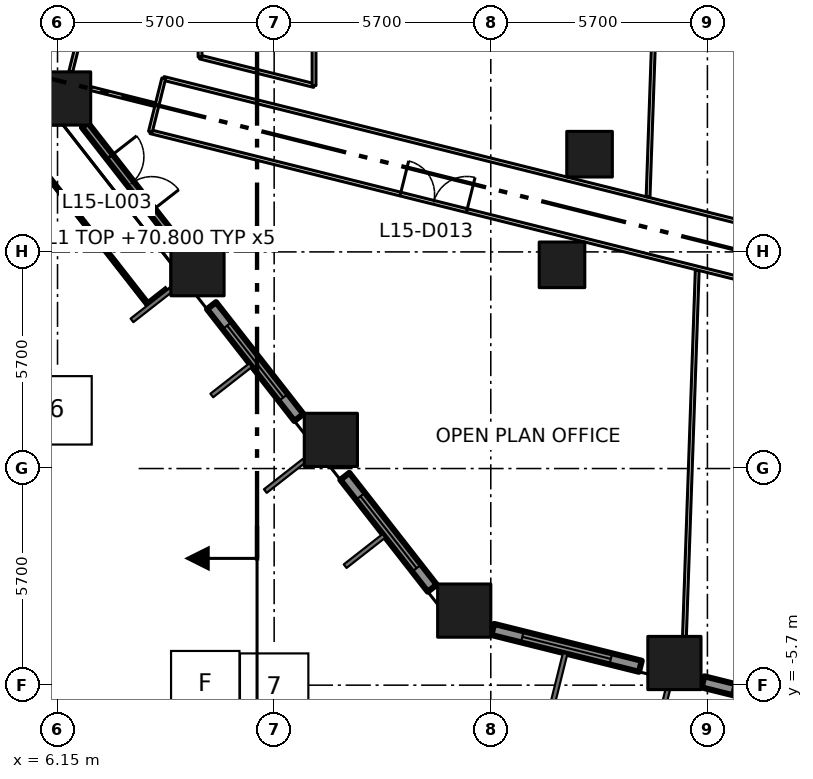
"""IFC4 building model, lengths in metres.
Left out: names, types, materials, properties, quantities, classifications, styles, units other than length and angle.
Written with IfcOpenShell. Run it as: python <this file> out.ifc"""

import sys

from ifc_helpers import new_model, si_unit, direction, frame, frame_2d, origin, origin_2d, place, context, subcontext, project, spatial, rectangle, extrude, element, fill, save


model = new_model("IFC4")
c1 = context("Model", 3, precision=1e-05, world=origin(), true_north=direction((0.0, 1.0)))
c2 = subcontext(c1, "Body", "Model", "MODEL_VIEW")
j1 = project(units=[si_unit("LENGTHUNIT", "METRE"), si_unit("PLANEANGLEUNIT", "RADIAN")], contexts=[c1])
p1 = place(None, origin())
s1 = spatial("IfcSite", under=j1, at=p1, CompositionType="ELEMENT")
p2 = place(p1, origin())
s2 = spatial("IfcBuilding", under=s1, at=p2, CompositionType="ELEMENT")
p3 = place(p2, frame((0.0, 0.0, 70.8)))
s3 = spatial("IfcBuildingStorey", under=s2, at=p3, CompositionType="ELEMENT", Elevation=70.8)
for number, where, z_axis, x_axis in (
    (1, (16.851, -3.738, 0.0), (0.0, 0.0, 1.0), (1.0, 0.0, 0.0)),
    (2, (13.342, 0.754, 0.0), (0.0, 0.0, 1.0), (1.0, 0.0, 0.0)),
    (3, (9.833, 5.245, 0.0), (0.0, 0.0, 1.0), (1.0, 0.0, 0.0)),
    (4, (6.323, 9.737, 0.0), (0.0, 0.0, 1.0), (1.0, 0.0, 0.0)),
    (5, (22.382, -5.117, 0.0), (0.0, 0.0, 1.0), (1.0, 0.0, 0.0)),
):
    element("IfcColumn", number, at=place(p3, frame(where, z_axis=z_axis, x_axis=x_axis)), inside=s3, PredefinedType="COLUMN", context=c2, shape_type="SweptSolid", body=[
        extrude(rectangle(XDim=1.4, YDim=1.4, at=origin_2d()), origin(), (0.0, 0.0, 1.0), 4.2),
    ])
for number, where, z_axis, x_axis in (
    (6, (19.424, 5.36, 0.0), (0.0, 0.0, 1.0), (1.0, 0.0, 0.0)),
    (7, (20.149, 8.271, 0.0), (0.0, 0.0, 1.0), (1.0, 0.0, 0.0)),
):
    element("IfcColumn", number, at=place(p3, frame(where, z_axis=z_axis, x_axis=x_axis)), inside=s3, PredefinedType="COLUMN", context=c2, shape_type="SweptSolid", body=[
        extrude(rectangle(XDim=1.2, YDim=1.2, at=origin_2d()), origin(), (0.0, 0.0, 1.0), 4.2),
    ])
p4 = place(p3, frame((6.871, 9.037, 0.0), z_axis=(0.0, 0.0, 1.0), x_axis=(0.615507574125, -0.788130970204, 0.0)))
e8 = element("IfcWall", 8, at=p4, inside=s3, PredefinedType="SOLIDWALL", context=c2, shape_type="SweptSolid", body=[
    extrude(rectangle(XDim=3.923, YDim=0.2, at=frame_2d((1.962, 0.0))), origin(), (0.0, 0.0, 1.0), 3.1),
])
p5 = place(p4, frame((1.061, 0.0, 0.0)))
e9 = element("IfcOpeningElement", 9, at=p5, cuts=e8, PredefinedType="OPENING", context=c2, shape_type="SweptSolid", body=[
    extrude(rectangle(XDim=1.8, YDim=2.9, at=frame_2d((0.9, 1.45))), frame((0.0, 0.11, 0.0), z_axis=(0.0, -1.0, 0.0), x_axis=(1.0, 0.0, 0.0)), (0.0, 0.0, 1.0), 0.22),
])
p6 = place(p3, frame((10.202, 4.286, 0.0), z_axis=(0.0, 0.0, 1.0), x_axis=(0.615636430057, -0.788030320474, 0.0)))
e10 = element("IfcWall", 10, at=p6, inside=s3, PredefinedType="SOLIDWALL", context=c2, shape_type="SweptSolid", body=[
    extrude(rectangle(XDim=3.734, YDim=0.3, at=frame_2d((1.867, 0.0))), origin(), (0.0, 0.0, 1.0), 3.1),
])
p7 = place(p6, frame((0.667, 0.0, 0.8)))
e11 = element("IfcOpeningElement", 11, at=p7, cuts=e10, PredefinedType="OPENING", context=c2, shape_type="SweptSolid", body=[
    extrude(rectangle(XDim=2.4, YDim=2.1, at=frame_2d((1.2, 1.05))), frame((0.0, 0.16, 0.0), z_axis=(0.0, -1.0, 0.0), x_axis=(1.0, 0.0, 0.0)), (0.0, 0.0, 1.0), 0.32),
])
p8 = place(p3, frame((13.71, -0.205, 0.0), z_axis=(0.0, 0.0, 1.0), x_axis=(0.615798780214, -0.787903460004, 0.0)))
e12 = element("IfcWall", 12, at=p8, inside=s3, PredefinedType="SOLIDWALL", context=c2, shape_type="SweptSolid", body=[
    extrude(rectangle(XDim=3.735, YDim=0.3, at=frame_2d((1.868, 0.0))), origin(), (0.0, 0.0, 1.0), 3.1),
])
p9 = place(p8, frame((0.667, 0.0, 0.8)))
e13 = element("IfcOpeningElement", 13, at=p9, cuts=e12, PredefinedType="OPENING", context=c2, shape_type="SweptSolid", body=[
    extrude(rectangle(XDim=2.4, YDim=2.1, at=frame_2d((1.2, 1.05))), frame((0.0, 0.16, 0.0), z_axis=(0.0, -1.0, 0.0), x_axis=(1.0, 0.0, 0.0)), (0.0, 0.0, 1.0), 0.32),
])
p10 = place(p3, frame((17.602, -4.234, 0.0), z_axis=(0.0, 0.0, 1.0), x_axis=(0.970260773365, -0.242062040951, 0.0)))
e14 = element("IfcWall", 14, at=p10, inside=s3, PredefinedType="SOLIDWALL", context=c2, shape_type="SweptSolid", body=[
    extrude(rectangle(XDim=4.003, YDim=0.3, at=frame_2d((2.001, 0.0))), origin(), (0.0, 0.0, 1.0), 3.1),
])
p11 = place(p10, frame((0.802, 0.0, 0.8)))
e15 = element("IfcOpeningElement", 15, at=p11, cuts=e14, PredefinedType="OPENING", context=c2, shape_type="SweptSolid", body=[
    extrude(rectangle(XDim=2.4, YDim=2.1, at=frame_2d((1.2, 1.05))), frame((0.0, 0.16, 0.0), z_axis=(0.0, -1.0, 0.0), x_axis=(1.0, 0.0, 0.0)), (0.0, 0.0, 1.0), 0.32),
])
p12 = place(p3, frame((23.133, -5.613, 0.0), z_axis=(0.0, 0.0, 1.0), x_axis=(0.970303772127, -0.241889623168, 0.0)))
e16 = element("IfcWall", 16, at=p12, inside=s3, PredefinedType="SOLIDWALL", context=c2, shape_type="SweptSolid", body=[
    extrude(rectangle(XDim=4.002, YDim=0.3, at=frame_2d((2.001, 0.0))), origin(), (0.0, 0.0, 1.0), 3.1),
])
p13 = place(p12, frame((0.801, 0.0, 0.8)))
e17 = element("IfcOpeningElement", 17, at=p13, cuts=e16, PredefinedType="OPENING", context=c2, shape_type="SweptSolid", body=[
    extrude(rectangle(XDim=2.4, YDim=2.1, at=frame_2d((1.2, 1.05))), frame((0.0, 0.16, 0.0), z_axis=(0.0, -1.0, 0.0), x_axis=(1.0, 0.0, 0.0)), (0.0, 0.0, 1.0), 0.32),
])
p14 = place(p3, frame((8.594, 8.862, 0.0), z_axis=(0.0, 0.0, 1.0), x_axis=(0.970293392615, -0.241931255211, 0.0)))
e18 = element("IfcWall", 18, at=p14, inside=s3, PredefinedType="PARTITIONING", context=c2, shape_type="SweptSolid", body=[
    extrude(rectangle(XDim=67.775, YDim=0.1, at=frame_2d((33.888, 0.0))), origin(), (0.0, 0.0, 1.0), 3.9),
])
p15 = place(p14, frame((36.911, 0.0, 0.0)))
e19 = element("IfcOpeningElement", 19, at=p15, cuts=e18, PredefinedType="OPENING", context=c2, shape_type="SweptSolid", body=[
    extrude(rectangle(XDim=1.0, YDim=2.1, at=frame_2d((0.5, 1.05))), frame((0.0, 0.06, 0.0), z_axis=(0.0, -1.0, 0.0), x_axis=(1.0, 0.0, 0.0)), (0.0, 0.0, 1.0), 0.12),
])
p16 = place(p14, frame((41.511, 0.0, 0.0)))
e20 = element("IfcOpeningElement", 20, at=p16, cuts=e18, PredefinedType="OPENING", context=c2, shape_type="SweptSolid", body=[
    extrude(rectangle(XDim=1.8, YDim=2.1, at=frame_2d((0.9, 1.05))), frame((0.0, 0.06, 0.0), z_axis=(0.0, -1.0, 0.0), x_axis=(1.0, 0.0, 0.0)), (0.0, 0.0, 1.0), 0.12),
])
p17 = place(p14, frame((58.611, 0.0, 0.0)))
e21 = element("IfcOpeningElement", 21, at=p17, cuts=e18, PredefinedType="OPENING", context=c2, shape_type="SweptSolid", body=[
    extrude(rectangle(XDim=1.0, YDim=2.1, at=frame_2d((0.5, 1.05))), frame((0.0, 0.06, 0.0), z_axis=(0.0, -1.0, 0.0), x_axis=(1.0, 0.0, 0.0)), (0.0, 0.0, 1.0), 0.12),
])
p18 = place(p14, frame((18.511, 0.0, 0.0)))
e22 = element("IfcOpeningElement", 22, at=p18, cuts=e18, PredefinedType="OPENING", context=c2, shape_type="SweptSolid", body=[
    extrude(rectangle(XDim=1.0, YDim=2.1, at=frame_2d((0.5, 1.05))), frame((0.0, 0.06, 0.0), z_axis=(0.0, -1.0, 0.0), x_axis=(1.0, 0.0, 0.0)), (0.0, 0.0, 1.0), 0.12),
])
p19 = place(p14, frame((23.811, 0.0, 0.0)))
e23 = element("IfcOpeningElement", 23, at=p19, cuts=e18, PredefinedType="OPENING", context=c2, shape_type="SweptSolid", body=[
    extrude(rectangle(XDim=1.8, YDim=2.1, at=frame_2d((0.9, 1.05))), frame((0.0, 0.06, 0.0), z_axis=(0.0, -1.0, 0.0), x_axis=(1.0, 0.0, 0.0)), (0.0, 0.0, 1.0), 0.12),
])
p20 = place(p14, frame((6.78, 0.0, 0.0)))
e24 = element("IfcOpeningElement", 24, at=p20, cuts=e18, PredefinedType="OPENING", context=c2, shape_type="SweptSolid", body=[
    extrude(rectangle(XDim=1.8, YDim=2.1, at=frame_2d((0.9, 1.05))), frame((0.0, 0.06, 0.0), z_axis=(0.0, -1.0, 0.0), x_axis=(1.0, 0.0, 0.0)), (0.0, 0.0, 1.0), 0.12),
])
p21 = place(p3, frame((8.944, 10.264, 0.0), z_axis=(0.0, 0.0, 1.0), x_axis=(0.970300504447, -0.241902730595, 0.0)))
e25 = element("IfcWall", 25, at=p21, inside=s3, PredefinedType="PARTITIONING", context=c2, shape_type="SweptSolid", body=[
    extrude(rectangle(XDim=19.879, YDim=0.1, at=frame_2d((9.939, 0.0))), origin(), (0.0, 0.0, 1.0), 3.9),
])
p22 = place(p3, frame((8.944, 10.264, 0.0), z_axis=(0.0, 0.0, 1.0), x_axis=(-0.242297077633, -0.970202105837, 0.0)))
e26 = element("IfcWall", 26, at=p22, inside=s3, PredefinedType="PARTITIONING", context=c2, shape_type="SweptSolid", body=[
    extrude(rectangle(XDim=1.445, YDim=0.1, at=frame_2d((0.722, 0.0))), origin(), (0.0, 0.0, 1.0), 3.9),
])
p23 = place(p3, frame((9.9, 10.826, 0.0), z_axis=(0.0, 0.0, 1.0), x_axis=(0.970290953223, -0.241941038466, 0.0)))
e27 = element("IfcWall", 27, at=p23, inside=s3, PredefinedType="PARTITIONING", context=c2, shape_type="SweptSolid", body=[
    extrude(rectangle(XDim=3.092, YDim=0.1, at=frame_2d((1.546, 0.0))), origin(), (0.0, 0.0, 1.0), 3.9),
])
p24 = place(p3, frame((9.9, 12.2, 0.0), z_axis=(0.0, 0.0, 1.0), x_axis=(0.0, -1.0, 0.0)))
e28 = element("IfcWall", 28, at=p24, inside=s3, PredefinedType="PARTITIONING", context=c2, shape_type="SweptSolid", body=[
    extrude(rectangle(XDim=1.374, YDim=0.1, at=frame_2d((0.687, 0.0))), origin(), (0.0, 0.0, 1.0), 3.9),
])
p25 = place(p3, frame((12.9, 10.078, 0.0), z_axis=(0.0, 0.0, 1.0), x_axis=(0.0, 1.0, 0.0)))
e29 = element("IfcWall", 29, at=p25, inside=s3, PredefinedType="PARTITIONING", context=c2, shape_type="SweptSolid", body=[
    extrude(rectangle(XDim=4.022, YDim=0.1, at=frame_2d((2.011, 0.0))), origin(), (0.0, 0.0, 1.0), 3.9),
])
p26 = place(p3, frame((6.922, 12.138, 0.0), z_axis=(0.0, 0.0, 1.0), x_axis=(-0.242437328426, -0.970167069007, 0.0)))
e30 = element("IfcWall", 30, at=p26, inside=s3, PredefinedType="PARTITIONING", context=c2, shape_type="SweptSolid", body=[
    extrude(rectangle(XDim=1.753, YDim=0.1, at=frame_2d((0.876, 0.0))), origin(), (0.0, 0.0, 1.0), 3.9),
])
p27 = place(p3, frame((8.72, 9.574, 0.0), z_axis=(0.0, 0.0, 1.0), x_axis=(-0.97016712555, 0.242437102155, 0.0)))
e31 = element("IfcWall", 31, at=p27, inside=s3, PredefinedType="PARTITIONING", context=c2, shape_type="SweptSolid", body=[
    extrude(rectangle(XDim=1.749, YDim=0.1, at=frame_2d((0.875, 0.0))), origin(), (0.0, 0.0, 1.0), 3.9),
])
p28 = place(p3, frame((21.689, 7.149, 0.0), z_axis=(0.0, 0.0, 1.0), x_axis=(0.03492529419, 0.999389925818, 0.0)))
e32 = element("IfcWall", 32, at=p28, inside=s3, PredefinedType="PARTITIONING", context=c2, shape_type="SweptSolid", body=[
    extrude(rectangle(XDim=6.955, YDim=0.1, at=frame_2d((3.478, 0.0))), origin(), (0.0, 0.0, 1.0), 3.9),
])
p29 = place(p3, frame((22.646, -4.417, 0.0), z_axis=(0.0, 0.0, 1.0), x_axis=(0.03486722434, 0.999391953473, 0.0)))
e33 = element("IfcWall", 33, at=p29, inside=s3, PredefinedType="PARTITIONING", context=c2, shape_type="SweptSolid", body=[
    extrude(rectangle(XDim=9.635, YDim=0.1, at=frame_2d((4.817, 0.0))), origin(), (0.0, 0.0, 1.0), 3.9),
])
p30 = place(p5, origin())
e34 = element("IfcDoor", 34, at=p30, inside=s3, OperationType="DOUBLE_DOOR_SINGLE_SWING", PredefinedType="DOOR", context=c2, shape_type="SweptSolid", body=[
    extrude(rectangle(XDim=1.8, YDim=2.9, at=frame_2d((0.9, 1.45))), frame((0.0, 0.025, 0.0), z_axis=(0.0, -1.0, 0.0), x_axis=(1.0, 0.0, 0.0)), (0.0, 0.0, 1.0), 0.05),
])
fill(e9, e34)
p31 = place(p7, origin())
e35 = element("IfcWindow", 35, at=p31, inside=s3, PartitioningType="DOUBLE_PANEL_VERTICAL", PredefinedType="WINDOW", context=c2, shape_type="SweptSolid", body=[
    extrude(rectangle(XDim=2.4, YDim=2.1, at=frame_2d((1.2, 1.05))), frame((0.0, 0.03, 0.0), z_axis=(0.0, -1.0, 0.0), x_axis=(1.0, 0.0, 0.0)), (0.0, 0.0, 1.0), 0.06),
])
fill(e11, e35)
p32 = place(p9, origin())
e36 = element("IfcWindow", 36, at=p32, inside=s3, PartitioningType="DOUBLE_PANEL_VERTICAL", PredefinedType="WINDOW", context=c2, shape_type="SweptSolid", body=[
    extrude(rectangle(XDim=2.4, YDim=2.1, at=frame_2d((1.2, 1.05))), frame((0.0, 0.03, 0.0), z_axis=(0.0, -1.0, 0.0), x_axis=(1.0, 0.0, 0.0)), (0.0, 0.0, 1.0), 0.06),
])
fill(e13, e36)
p33 = place(p11, origin())
e37 = element("IfcWindow", 37, at=p33, inside=s3, PartitioningType="DOUBLE_PANEL_VERTICAL", PredefinedType="WINDOW", context=c2, shape_type="SweptSolid", body=[
    extrude(rectangle(XDim=2.4, YDim=2.1, at=frame_2d((1.2, 1.05))), frame((0.0, 0.03, 0.0), z_axis=(0.0, -1.0, 0.0), x_axis=(1.0, 0.0, 0.0)), (0.0, 0.0, 1.0), 0.06),
])
fill(e15, e37)
p34 = place(p13, origin())
e38 = element("IfcWindow", 38, at=p34, inside=s3, PartitioningType="DOUBLE_PANEL_VERTICAL", PredefinedType="WINDOW", context=c2, shape_type="SweptSolid", body=[
    extrude(rectangle(XDim=2.4, YDim=2.1, at=frame_2d((1.2, 1.05))), frame((0.0, 0.03, 0.0), z_axis=(0.0, -1.0, 0.0), x_axis=(1.0, 0.0, 0.0)), (0.0, 0.0, 1.0), 0.06),
])
fill(e17, e38)
p35 = place(p20, origin())
e39 = element("IfcDoor", 39, at=p35, inside=s3, OperationType="DOUBLE_DOOR_SINGLE_SWING", PredefinedType="DOOR", context=c2, shape_type="SweptSolid", body=[
    extrude(rectangle(XDim=1.8, YDim=2.1, at=frame_2d((0.9, 1.05))), frame((0.0, 0.025, 0.0), z_axis=(0.0, -1.0, 0.0), x_axis=(1.0, 0.0, 0.0)), (0.0, 0.0, 1.0), 0.05),
])
fill(e24, e39)
save(model, sys.argv[1])
